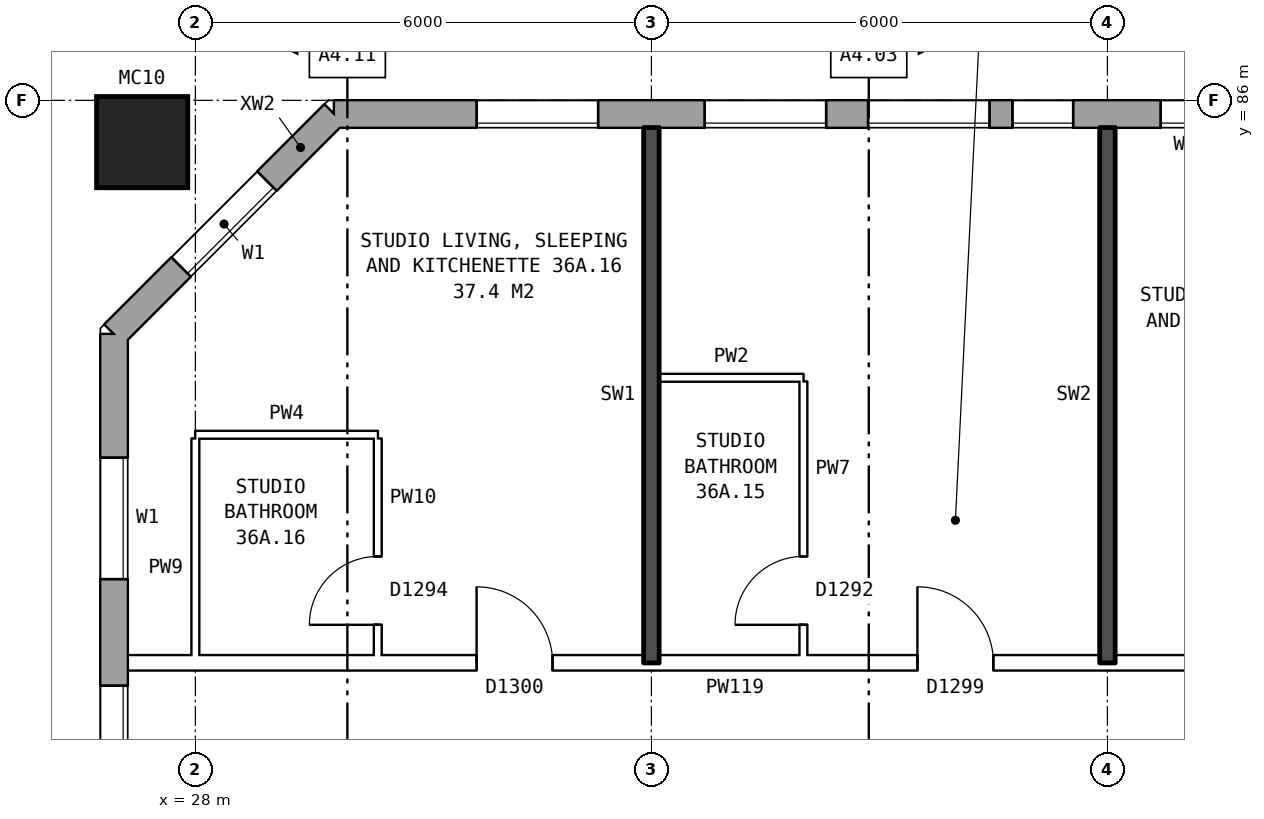
"""IFC4 building model, lengths in metres.
Left out: names, types, materials, properties, quantities, classifications, styles, units other than length and angle.
Written with IfcOpenShell. Run it as: python <this file> out.ifc"""

import sys

from ifc_helpers import new_model, si_unit, direction, frame, frame_2d, origin, origin_2d, place, context, subcontext, project, spatial, rectangle, hollow_rectangle, extrude, element, fill, save


model = new_model("IFC4")
c1 = context("Model", 3, precision=1e-05, world=origin(), true_north=direction((0.0, 1.0)))
c2 = subcontext(c1, "Body", "Model", "MODEL_VIEW")
j1 = project(units=[si_unit("LENGTHUNIT", "METRE"), si_unit("PLANEANGLEUNIT", "RADIAN")], contexts=[c1])
p1 = place(None, origin())
s1 = spatial("IfcSite", under=j1, at=p1, CompositionType="ELEMENT")
p2 = place(p1, origin())
s2 = spatial("IfcBuilding", under=s1, at=p2, CompositionType="ELEMENT")
p3 = place(p2, frame((0.0, 0.0, 129.9)))
s3 = spatial("IfcBuildingStorey", under=s2, at=p3, CompositionType="ELEMENT", Elevation=129.9)
p4 = place(p3, frame((27.3, 85.45, 0.0), z_axis=(0.0, 0.0, 1.0), x_axis=(1.0, 0.0, 0.0)))
e1 = element("IfcColumn", 1, at=p4, inside=s3, PredefinedType="COLUMN", context=c2, shape_type="SweptSolid", body=[
    extrude(hollow_rectangle(XDim=1.2, YDim=1.2, WallThickness=0.065, at=origin_2d()), origin(), (0.0, 0.0, 1.0), 3.1),
])
p5 = place(p3, frame((72.925, 85.82, 0.0), z_axis=(0.0, 0.0, 1.0), x_axis=(-1.0, 0.0, 0.0)))
e2 = element("IfcWall", 2, at=p5, inside=s3, PredefinedType="STANDARD", context=c2, shape_type="SweptSolid", body=[
    extrude(rectangle(XDim=43.101, YDim=0.36, at=frame_2d((21.55, 0.0))), origin(), (0.0, 0.0, 1.0), 2.85),
])
p6 = place(p5, frame((0.625, 0.0, 0.8)))
e3 = element("IfcOpeningElement", 3, at=p6, cuts=e2, PredefinedType="OPENING", context=c2, shape_type="SweptSolid", body=[
    extrude(rectangle(XDim=1.6, YDim=1.8, at=frame_2d((0.8, 0.9))), frame((0.0, 0.19, 0.0), z_axis=(0.0, -1.0, 0.0), x_axis=(1.0, 0.0, 0.0)), (0.0, 0.0, 1.0), 0.38),
])
p7 = place(p5, frame((3.625, 0.0, 0.8)))
e4 = element("IfcOpeningElement", 4, at=p7, cuts=e2, PredefinedType="OPENING", context=c2, shape_type="SweptSolid", body=[
    extrude(rectangle(XDim=1.6, YDim=1.8, at=frame_2d((0.8, 0.9))), frame((0.0, 0.19, 0.0), z_axis=(0.0, -1.0, 0.0), x_axis=(1.0, 0.0, 0.0)), (0.0, 0.0, 1.0), 0.38),
])
p8 = place(p5, frame((6.625, 0.0, 0.8)))
e5 = element("IfcOpeningElement", 5, at=p8, cuts=e2, PredefinedType="OPENING", context=c2, shape_type="SweptSolid", body=[
    extrude(rectangle(XDim=1.6, YDim=1.8, at=frame_2d((0.8, 0.9))), frame((0.0, 0.19, 0.0), z_axis=(0.0, -1.0, 0.0), x_axis=(1.0, 0.0, 0.0)), (0.0, 0.0, 1.0), 0.38),
])
p9 = place(p5, frame((10.175, 0.0, 0.15)))
e6 = element("IfcOpeningElement", 6, at=p9, cuts=e2, PredefinedType="OPENING", context=c2, shape_type="SweptSolid", body=[
    extrude(rectangle(XDim=0.6, YDim=0.9, at=frame_2d((0.3, 0.45))), frame((0.0, 0.19, 0.0), z_axis=(0.0, -1.0, 0.0), x_axis=(1.0, 0.0, 0.0)), (0.0, 0.0, 1.0), 0.38),
])
p10 = place(p5, frame((12.625, 0.0, 0.8)))
e7 = element("IfcOpeningElement", 7, at=p10, cuts=e2, PredefinedType="OPENING", context=c2, shape_type="SweptSolid", body=[
    extrude(rectangle(XDim=1.6, YDim=1.8, at=frame_2d((0.8, 0.9))), frame((0.0, 0.19, 0.0), z_axis=(0.0, -1.0, 0.0), x_axis=(1.0, 0.0, 0.0)), (0.0, 0.0, 1.0), 0.38),
])
p11 = place(p5, frame((15.625, 0.0, 0.8)))
e8 = element("IfcOpeningElement", 8, at=p11, cuts=e2, PredefinedType="OPENING", context=c2, shape_type="SweptSolid", body=[
    extrude(rectangle(XDim=1.6, YDim=1.8, at=frame_2d((0.8, 0.9))), frame((0.0, 0.19, 0.0), z_axis=(0.0, -1.0, 0.0), x_axis=(1.0, 0.0, 0.0)), (0.0, 0.0, 1.0), 0.38),
])
p12 = place(p5, frame((18.625, 0.0, 0.8)))
e9 = element("IfcOpeningElement", 9, at=p12, cuts=e2, PredefinedType="OPENING", context=c2, shape_type="SweptSolid", body=[
    extrude(rectangle(XDim=1.6, YDim=1.8, at=frame_2d((0.8, 0.9))), frame((0.0, 0.19, 0.0), z_axis=(0.0, -1.0, 0.0), x_axis=(1.0, 0.0, 0.0)), (0.0, 0.0, 1.0), 0.38),
])
p13 = place(p5, frame((21.625, 0.0, 0.8)))
e10 = element("IfcOpeningElement", 10, at=p13, cuts=e2, PredefinedType="OPENING", context=c2, shape_type="SweptSolid", body=[
    extrude(rectangle(XDim=1.6, YDim=1.8, at=frame_2d((0.8, 0.9))), frame((0.0, 0.19, 0.0), z_axis=(0.0, -1.0, 0.0), x_axis=(1.0, 0.0, 0.0)), (0.0, 0.0, 1.0), 0.38),
])
p14 = place(p5, frame((24.625, 0.0, 0.8)))
e11 = element("IfcOpeningElement", 11, at=p14, cuts=e2, PredefinedType="OPENING", context=c2, shape_type="SweptSolid", body=[
    extrude(rectangle(XDim=1.6, YDim=1.8, at=frame_2d((0.8, 0.9))), frame((0.0, 0.19, 0.0), z_axis=(0.0, -1.0, 0.0), x_axis=(1.0, 0.0, 0.0)), (0.0, 0.0, 1.0), 0.38),
])
p15 = place(p5, frame((27.625, 0.0, 0.8)))
e12 = element("IfcOpeningElement", 12, at=p15, cuts=e2, PredefinedType="OPENING", context=c2, shape_type="SweptSolid", body=[
    extrude(rectangle(XDim=1.6, YDim=1.8, at=frame_2d((0.8, 0.9))), frame((0.0, 0.19, 0.0), z_axis=(0.0, -1.0, 0.0), x_axis=(1.0, 0.0, 0.0)), (0.0, 0.0, 1.0), 0.38),
])
p16 = place(p5, frame((29.525, 0.0, 0.8)))
e13 = element("IfcOpeningElement", 13, at=p16, cuts=e2, PredefinedType="OPENING", context=c2, shape_type="SweptSolid", body=[
    extrude(rectangle(XDim=1.6, YDim=1.8, at=frame_2d((0.8, 0.9))), frame((0.0, 0.19, 0.0), z_axis=(0.0, -1.0, 0.0), x_axis=(1.0, 0.0, 0.0)), (0.0, 0.0, 1.0), 0.38),
])
p17 = place(p5, frame((33.375, 0.0, 1.7)))
e14 = element("IfcOpeningElement", 14, at=p17, cuts=e2, PredefinedType="OPENING", context=c2, shape_type="SweptSolid", body=[
    extrude(rectangle(XDim=0.8, YDim=0.9, at=frame_2d((0.4, 0.45))), frame((0.0, 0.19, 0.0), z_axis=(0.0, -1.0, 0.0), x_axis=(1.0, 0.0, 0.0)), (0.0, 0.0, 1.0), 0.38),
])
p18 = place(p5, frame((36.625, 0.0, 0.8)))
e15 = element("IfcOpeningElement", 15, at=p18, cuts=e2, PredefinedType="OPENING", context=c2, shape_type="SweptSolid", body=[
    extrude(rectangle(XDim=1.6, YDim=1.8, at=frame_2d((0.8, 0.9))), frame((0.0, 0.19, 0.0), z_axis=(0.0, -1.0, 0.0), x_axis=(1.0, 0.0, 0.0)), (0.0, 0.0, 1.0), 0.38),
])
p19 = place(p5, frame((39.625, 0.0, 0.8)))
e16 = element("IfcOpeningElement", 16, at=p19, cuts=e2, PredefinedType="OPENING", context=c2, shape_type="SweptSolid", body=[
    extrude(rectangle(XDim=1.6, YDim=1.8, at=frame_2d((0.8, 0.9))), frame((0.0, 0.19, 0.0), z_axis=(0.0, -1.0, 0.0), x_axis=(1.0, 0.0, 0.0)), (0.0, 0.0, 1.0), 0.38),
])
p20 = place(p5, frame((11.175, 0.0, 0.15)))
e17 = element("IfcOpeningElement", 17, at=p20, cuts=e2, PredefinedType="OPENING", context=c2, shape_type="SweptSolid", body=[
    extrude(rectangle(XDim=0.6, YDim=1.8, at=frame_2d((0.3, 0.9))), frame((0.0, 0.19, 0.0), z_axis=(0.0, -1.0, 0.0), x_axis=(1.0, 0.0, 0.0)), (0.0, 0.0, 1.0), 0.38),
])
p21 = place(p5, frame((31.425, 0.0, 0.8)))
e18 = element("IfcOpeningElement", 18, at=p21, cuts=e2, PredefinedType="OPENING", context=c2, shape_type="SweptSolid", body=[
    extrude(rectangle(XDim=0.8, YDim=0.9, at=frame_2d((0.4, 0.45))), frame((0.0, 0.19, 0.0), z_axis=(0.0, -1.0, 0.0), x_axis=(1.0, 0.0, 0.0)), (0.0, 0.0, 1.0), 0.38),
])
p22 = place(p5, frame((34.475, 0.0, 0.8)))
e19 = element("IfcOpeningElement", 19, at=p22, cuts=e2, PredefinedType="OPENING", context=c2, shape_type="SweptSolid", body=[
    extrude(rectangle(XDim=1.6, YDim=1.8, at=frame_2d((0.8, 0.9))), frame((0.0, 0.19, 0.0), z_axis=(0.0, -1.0, 0.0), x_axis=(1.0, 0.0, 0.0)), (0.0, 0.0, 1.0), 0.38),
])
p23 = place(p3, frame((29.825, 85.82, 0.0), z_axis=(0.0, 0.0, 1.0), x_axis=(-0.707106781187, -0.707106781187, 0.0)))
e20 = element("IfcWall", 20, at=p23, inside=s3, PredefinedType="STANDARD", context=c2, shape_type="SweptSolid", body=[
    extrude(rectangle(XDim=4.094, YDim=0.36, at=frame_2d((2.047, 0.0))), origin(), (0.0, 0.0, 1.0), 2.85),
])
p24 = place(p23, frame((1.247, 0.0, 0.8)))
e21 = element("IfcOpeningElement", 21, at=p24, cuts=e20, PredefinedType="OPENING", context=c2, shape_type="SweptSolid", body=[
    extrude(rectangle(XDim=1.6, YDim=1.8, at=frame_2d((0.8, 0.9))), frame((0.0, 0.19, 0.0), z_axis=(0.0, -1.0, 0.0), x_axis=(1.0, 0.0, 0.0)), (0.0, 0.0, 1.0), 0.38),
])
p25 = place(p3, frame((26.93, 82.925, 0.0), z_axis=(0.0, 0.0, 1.0), x_axis=(0.0, -1.0, 0.0)))
e22 = element("IfcWall", 22, at=p25, inside=s3, PredefinedType="STANDARD", context=c2, shape_type="SweptSolid", body=[
    extrude(rectangle(XDim=25.851, YDim=0.36, at=frame_2d((12.925, 0.0))), origin(), (0.0, 0.0, 1.0), 2.85),
])
p26 = place(p25, frame((1.625, 0.0, 0.8)))
e23 = element("IfcOpeningElement", 23, at=p26, cuts=e22, PredefinedType="OPENING", context=c2, shape_type="SweptSolid", body=[
    extrude(rectangle(XDim=1.6, YDim=1.8, at=frame_2d((0.8, 0.9))), frame((0.0, 0.19, 0.0), z_axis=(0.0, -1.0, 0.0), x_axis=(1.0, 0.0, 0.0)), (0.0, 0.0, 1.0), 0.38),
])
p27 = place(p25, frame((4.625, 0.0, 0.8)))
e24 = element("IfcOpeningElement", 24, at=p27, cuts=e22, PredefinedType="OPENING", context=c2, shape_type="SweptSolid", body=[
    extrude(rectangle(XDim=1.6, YDim=1.8, at=frame_2d((0.8, 0.9))), frame((0.0, 0.19, 0.0), z_axis=(0.0, -1.0, 0.0), x_axis=(1.0, 0.0, 0.0)), (0.0, 0.0, 1.0), 0.38),
])
p28 = place(p25, frame((7.625, 0.0, 0.8)))
e25 = element("IfcOpeningElement", 25, at=p28, cuts=e22, PredefinedType="OPENING", context=c2, shape_type="SweptSolid", body=[
    extrude(rectangle(XDim=1.6, YDim=1.8, at=frame_2d((0.8, 0.9))), frame((0.0, 0.19, 0.0), z_axis=(0.0, -1.0, 0.0), x_axis=(1.0, 0.0, 0.0)), (0.0, 0.0, 1.0), 0.38),
])
p29 = place(p25, frame((6.525, 0.0, 0.8)))
e26 = element("IfcOpeningElement", 26, at=p29, cuts=e22, PredefinedType="OPENING", context=c2, shape_type="SweptSolid", body=[
    extrude(rectangle(XDim=0.8, YDim=1.8, at=frame_2d((0.4, 0.9))), frame((0.0, 0.19, 0.0), z_axis=(0.0, -1.0, 0.0), x_axis=(1.0, 0.0, 0.0)), (0.0, 0.0, 1.0), 0.38),
])
p30 = place(p25, frame((9.525, 0.0, 0.8)))
e27 = element("IfcOpeningElement", 27, at=p30, cuts=e22, PredefinedType="OPENING", context=c2, shape_type="SweptSolid", body=[
    extrude(rectangle(XDim=1.4, YDim=1.2, at=frame_2d((0.7, 0.6))), frame((0.0, 0.19, 0.0), z_axis=(0.0, -1.0, 0.0), x_axis=(1.0, 0.0, 0.0)), (0.0, 0.0, 1.0), 0.38),
])
p31 = place(p25, frame((16.625, 0.0, 0.8)))
e28 = element("IfcOpeningElement", 28, at=p31, cuts=e22, PredefinedType="OPENING", context=c2, shape_type="SweptSolid", body=[
    extrude(rectangle(XDim=1.6, YDim=1.8, at=frame_2d((0.8, 0.9))), frame((0.0, 0.19, 0.0), z_axis=(0.0, -1.0, 0.0), x_axis=(1.0, 0.0, 0.0)), (0.0, 0.0, 1.0), 0.38),
])
p32 = place(p25, frame((19.625, 0.0, 0.8)))
e29 = element("IfcOpeningElement", 29, at=p32, cuts=e22, PredefinedType="OPENING", context=c2, shape_type="SweptSolid", body=[
    extrude(rectangle(XDim=1.6, YDim=1.8, at=frame_2d((0.8, 0.9))), frame((0.0, 0.19, 0.0), z_axis=(0.0, -1.0, 0.0), x_axis=(1.0, 0.0, 0.0)), (0.0, 0.0, 1.0), 0.38),
])
p33 = place(p25, frame((22.625, 0.0, 0.8)))
e30 = element("IfcOpeningElement", 30, at=p33, cuts=e22, PredefinedType="OPENING", context=c2, shape_type="SweptSolid", body=[
    extrude(rectangle(XDim=1.6, YDim=1.8, at=frame_2d((0.8, 0.9))), frame((0.0, 0.19, 0.0), z_axis=(0.0, -1.0, 0.0), x_axis=(1.0, 0.0, 0.0)), (0.0, 0.0, 1.0), 0.38),
])
p34 = place(p25, frame((12.275, 0.0, 0.8)))
e31 = element("IfcOpeningElement", 31, at=p34, cuts=e22, PredefinedType="OPENING", context=c2, shape_type="SweptSolid", body=[
    extrude(rectangle(XDim=1.2, YDim=1.8, at=frame_2d((0.6, 0.9))), frame((0.0, 0.19, 0.0), z_axis=(0.0, -1.0, 0.0), x_axis=(1.0, 0.0, 0.0)), (0.0, 0.0, 1.0), 0.38),
])
p35 = place(p25, frame((14.425, 0.0, 0.8)))
e32 = element("IfcOpeningElement", 32, at=p35, cuts=e22, PredefinedType="OPENING", context=c2, shape_type="SweptSolid", body=[
    extrude(rectangle(XDim=1.2, YDim=0.9, at=frame_2d((0.6, 0.45))), frame((0.0, 0.19, 0.0), z_axis=(0.0, -1.0, 0.0), x_axis=(1.0, 0.0, 0.0)), (0.0, 0.0, 1.0), 0.38),
])
p36 = place(p25, frame((18.525, 0.0, 0.8)))
e33 = element("IfcOpeningElement", 33, at=p36, cuts=e22, PredefinedType="OPENING", context=c2, shape_type="SweptSolid", body=[
    extrude(rectangle(XDim=0.6, YDim=1.8, at=frame_2d((0.3, 0.9))), frame((0.0, 0.19, 0.0), z_axis=(0.0, -1.0, 0.0), x_axis=(1.0, 0.0, 0.0)), (0.0, 0.0, 1.0), 0.38),
])
p37 = place(p3, frame((27.11, 78.6, 0.0), z_axis=(0.0, 0.0, 1.0), x_axis=(1.0, 0.0, 0.0)))
e34 = element("IfcWall", 34, at=p37, inside=s3, PredefinedType="PARTITIONING", context=c2, shape_type="SweptSolid", body=[
    extrude(rectangle(XDim=18.79, YDim=0.2, at=frame_2d((9.395, 0.0))), origin(), (0.0, 0.0, 1.0), 2.85),
])
p38 = place(p37, frame((14.19, 0.0, 0.0)))
e35 = element("IfcOpeningElement", 35, at=p38, cuts=e34, PredefinedType="OPENING", context=c2, shape_type="SweptSolid", body=[
    extrude(rectangle(XDim=1.0, YDim=2.1, at=frame_2d((0.5, 1.05))), frame((0.0, 0.11, 0.0), z_axis=(0.0, -1.0, 0.0), x_axis=(1.0, 0.0, 0.0)), (0.0, 0.0, 1.0), 0.22),
])
p39 = place(p37, frame((10.39, 0.0, 0.0)))
e36 = element("IfcOpeningElement", 36, at=p39, cuts=e34, PredefinedType="OPENING", context=c2, shape_type="SweptSolid", body=[
    extrude(rectangle(XDim=1.0, YDim=2.1, at=frame_2d((0.5, 1.05))), frame((0.0, 0.11, 0.0), z_axis=(0.0, -1.0, 0.0), x_axis=(1.0, 0.0, 0.0)), (0.0, 0.0, 1.0), 0.22),
])
p40 = place(p37, frame((4.59, 0.0, 0.0)))
e37 = element("IfcOpeningElement", 37, at=p40, cuts=e34, PredefinedType="OPENING", context=c2, shape_type="SweptSolid", body=[
    extrude(rectangle(XDim=1.0, YDim=2.1, at=frame_2d((0.5, 1.05))), frame((0.0, 0.11, 0.0), z_axis=(0.0, -1.0, 0.0), x_axis=(1.0, 0.0, 0.0)), (0.0, 0.0, 1.0), 0.22),
])
p41 = place(p3, frame((28.0, 81.6, 0.0), z_axis=(0.0, 0.0, 1.0), x_axis=(1.0, 0.0, 0.0)))
e38 = element("IfcWall", 38, at=p41, inside=s3, PredefinedType="PARTITIONING", context=c2, shape_type="SweptSolid", body=[
    extrude(rectangle(XDim=2.4, YDim=0.1, at=frame_2d((1.2, 0.0))), origin(), (0.0, 0.0, 1.0), 2.85),
])
p42 = place(p3, frame((34.1, 82.35, 0.0), z_axis=(0.0, 0.0, 1.0), x_axis=(1.0, 0.0, 0.0)))
e39 = element("IfcWall", 39, at=p42, inside=s3, PredefinedType="PARTITIONING", context=c2, shape_type="SweptSolid", body=[
    extrude(rectangle(XDim=1.9, YDim=0.1, at=frame_2d((0.95, 0.0))), origin(), (0.0, 0.0, 1.0), 2.85),
])
p43 = place(p3, frame((28.0, 78.7, 0.0), z_axis=(0.0, 0.0, 1.0), x_axis=(0.0, 1.0, 0.0)))
e40 = element("IfcWall", 40, at=p43, inside=s3, PredefinedType="PARTITIONING", context=c2, shape_type="SweptSolid", body=[
    extrude(rectangle(XDim=2.85, YDim=0.1, at=frame_2d((1.425, 0.0))), origin(), (0.0, 0.0, 1.0), 2.85),
])
p44 = place(p3, frame((30.4, 78.7, 0.0), z_axis=(0.0, 0.0, 1.0), x_axis=(0.0, 1.0, 0.0)))
e41 = element("IfcWall", 41, at=p44, inside=s3, PredefinedType="PARTITIONING", context=c2, shape_type="SweptSolid", body=[
    extrude(rectangle(XDim=2.85, YDim=0.1, at=frame_2d((1.425, 0.0))), origin(), (0.0, 0.0, 1.0), 2.85),
])
p45 = place(p44, frame((0.4, 0.0, 0.0)))
e42 = element("IfcOpeningElement", 42, at=p45, cuts=e41, PredefinedType="OPENING", context=c2, shape_type="SweptSolid", body=[
    extrude(rectangle(XDim=0.9, YDim=2.1, at=frame_2d((0.45, 1.05))), frame((0.0, 0.06, 0.0), z_axis=(0.0, -1.0, 0.0), x_axis=(1.0, 0.0, 0.0)), (0.0, 0.0, 1.0), 0.12),
])
p46 = place(p3, frame((34.0, 78.6, 0.0), z_axis=(0.0, 0.0, 1.0), x_axis=(0.0, 1.0, 0.0)))
e43 = element("IfcWall", 43, at=p46, inside=s3, PredefinedType="SOLIDWALL", context=c2, shape_type="SweptSolid", body=[
    extrude(rectangle(XDim=7.04, YDim=0.2, at=frame_2d((3.52, 0.0))), origin(), (0.0, 0.0, 1.0), 2.85),
])
p47 = place(p3, frame((36.0, 78.7, 0.0), z_axis=(0.0, 0.0, 1.0), x_axis=(0.0, 1.0, 0.0)))
e44 = element("IfcWall", 44, at=p47, inside=s3, PredefinedType="PARTITIONING", context=c2, shape_type="SweptSolid", body=[
    extrude(rectangle(XDim=3.6, YDim=0.1, at=frame_2d((1.8, 0.0))), origin(), (0.0, 0.0, 1.0), 2.85),
])
p48 = place(p47, frame((0.4, 0.0, 0.0)))
e45 = element("IfcOpeningElement", 45, at=p48, cuts=e44, PredefinedType="OPENING", context=c2, shape_type="SweptSolid", body=[
    extrude(rectangle(XDim=0.9, YDim=2.1, at=frame_2d((0.45, 1.05))), frame((0.0, 0.06, 0.0), z_axis=(0.0, -1.0, 0.0), x_axis=(1.0, 0.0, 0.0)), (0.0, 0.0, 1.0), 0.12),
])
p49 = place(p3, frame((40.0, 78.6, 0.0), z_axis=(0.0, 0.0, 1.0), x_axis=(0.0, 1.0, 0.0)))
e46 = element("IfcWall", 46, at=p49, inside=s3, PredefinedType="SOLIDWALL", context=c2, shape_type="SweptSolid", body=[
    extrude(rectangle(XDim=7.04, YDim=0.2, at=frame_2d((3.52, 0.0))), origin(), (0.0, 0.0, 1.0), 2.85),
])
p50 = place(p17, origin())
e47 = element("IfcWindow", 47, at=p50, inside=s3, PartitioningType="SINGLE_PANEL", PredefinedType="WINDOW", context=c2, shape_type="SweptSolid", body=[
    extrude(rectangle(XDim=0.8, YDim=0.9, at=frame_2d((0.4, 0.45))), frame((0.0, 0.15, 0.0), z_axis=(0.0, -1.0, 0.0), x_axis=(1.0, 0.0, 0.0)), (0.0, 0.0, 1.0), 0.06),
])
fill(e14, e47)
p51 = place(p18, origin())
e48 = element("IfcWindow", 48, at=p51, inside=s3, PartitioningType="SINGLE_PANEL", PredefinedType="WINDOW", context=c2, shape_type="SweptSolid", body=[
    extrude(rectangle(XDim=1.6, YDim=1.8, at=frame_2d((0.8, 0.9))), frame((0.0, 0.15, 0.0), z_axis=(0.0, -1.0, 0.0), x_axis=(1.0, 0.0, 0.0)), (0.0, 0.0, 1.0), 0.06),
])
fill(e15, e48)
p52 = place(p19, origin())
e49 = element("IfcWindow", 49, at=p52, inside=s3, PartitioningType="SINGLE_PANEL", PredefinedType="WINDOW", context=c2, shape_type="SweptSolid", body=[
    extrude(rectangle(XDim=1.6, YDim=1.8, at=frame_2d((0.8, 0.9))), frame((0.0, 0.15, 0.0), z_axis=(0.0, -1.0, 0.0), x_axis=(1.0, 0.0, 0.0)), (0.0, 0.0, 1.0), 0.06),
])
fill(e16, e49)
p53 = place(p24, origin())
e50 = element("IfcWindow", 50, at=p53, inside=s3, PartitioningType="SINGLE_PANEL", PredefinedType="WINDOW", context=c2, shape_type="SweptSolid", body=[
    extrude(rectangle(XDim=1.6, YDim=1.8, at=frame_2d((0.8, 0.9))), frame((0.0, 0.15, 0.0), z_axis=(0.0, -1.0, 0.0), x_axis=(1.0, 0.0, 0.0)), (0.0, 0.0, 1.0), 0.06),
])
fill(e21, e50)
p54 = place(p26, origin())
e51 = element("IfcWindow", 51, at=p54, inside=s3, PartitioningType="SINGLE_PANEL", PredefinedType="WINDOW", context=c2, shape_type="SweptSolid", body=[
    extrude(rectangle(XDim=1.6, YDim=1.8, at=frame_2d((0.8, 0.9))), frame((0.0, 0.15, 0.0), z_axis=(0.0, -1.0, 0.0), x_axis=(1.0, 0.0, 0.0)), (0.0, 0.0, 1.0), 0.06),
])
fill(e23, e51)
p55 = place(p27, origin())
e52 = element("IfcWindow", 52, at=p55, inside=s3, PartitioningType="SINGLE_PANEL", PredefinedType="WINDOW", context=c2, shape_type="SweptSolid", body=[
    extrude(rectangle(XDim=1.6, YDim=1.8, at=frame_2d((0.8, 0.9))), frame((0.0, 0.15, 0.0), z_axis=(0.0, -1.0, 0.0), x_axis=(1.0, 0.0, 0.0)), (0.0, 0.0, 1.0), 0.06),
])
fill(e24, e52)
p56 = place(p39, origin())
e53 = element("IfcDoor", 53, at=p56, inside=s3, OperationType="SINGLE_SWING_LEFT", PredefinedType="DOOR", context=c2, shape_type="SweptSolid", body=[
    extrude(rectangle(XDim=1.0, YDim=2.1, at=frame_2d((0.5, 1.05))), frame((0.0, 0.025, 0.0), z_axis=(0.0, -1.0, 0.0), x_axis=(1.0, 0.0, 0.0)), (0.0, 0.0, 1.0), 0.05),
])
fill(e36, e53)
p57 = place(p48, origin())
e54 = element("IfcDoor", 54, at=p57, inside=s3, OperationType="SINGLE_SWING_LEFT", PredefinedType="DOOR", context=c2, shape_type="SweptSolid", body=[
    extrude(rectangle(XDim=0.9, YDim=2.1, at=frame_2d((0.45, 1.05))), frame((0.0, 0.025, 0.0), z_axis=(0.0, -1.0, 0.0), x_axis=(1.0, 0.0, 0.0)), (0.0, 0.0, 1.0), 0.05),
])
fill(e45, e54)
p58 = place(p40, origin())
e55 = element("IfcDoor", 55, at=p58, inside=s3, OperationType="SINGLE_SWING_LEFT", PredefinedType="DOOR", context=c2, shape_type="SweptSolid", body=[
    extrude(rectangle(XDim=1.0, YDim=2.1, at=frame_2d((0.5, 1.05))), frame((0.0, 0.025, 0.0), z_axis=(0.0, -1.0, 0.0), x_axis=(1.0, 0.0, 0.0)), (0.0, 0.0, 1.0), 0.05),
])
fill(e37, e55)
p59 = place(p45, origin())
e56 = element("IfcDoor", 56, at=p59, inside=s3, OperationType="SINGLE_SWING_LEFT", PredefinedType="DOOR", context=c2, shape_type="SweptSolid", body=[
    extrude(rectangle(XDim=0.9, YDim=2.1, at=frame_2d((0.45, 1.05))), frame((0.0, 0.025, 0.0), z_axis=(0.0, -1.0, 0.0), x_axis=(1.0, 0.0, 0.0)), (0.0, 0.0, 1.0), 0.05),
])
fill(e42, e56)
p60 = place(p21, origin())
e57 = element("IfcWindow", 57, at=p60, inside=s3, PartitioningType="SINGLE_PANEL", PredefinedType="WINDOW", context=c2, shape_type="SweptSolid", body=[
    extrude(rectangle(XDim=0.8, YDim=0.9, at=frame_2d((0.4, 0.45))), frame((0.0, 0.15, 0.0), z_axis=(0.0, -1.0, 0.0), x_axis=(1.0, 0.0, 0.0)), (0.0, 0.0, 1.0), 0.06),
])
fill(e18, e57)
p61 = place(p22, origin())
e58 = element("IfcWindow", 58, at=p61, inside=s3, PartitioningType="SINGLE_PANEL", PredefinedType="WINDOW", context=c2, shape_type="SweptSolid", body=[
    extrude(rectangle(XDim=1.6, YDim=1.8, at=frame_2d((0.8, 0.9))), frame((0.0, 0.15, 0.0), z_axis=(0.0, -1.0, 0.0), x_axis=(1.0, 0.0, 0.0)), (0.0, 0.0, 1.0), 0.06),
])
fill(e19, e58)
save(model, sys.argv[1])
